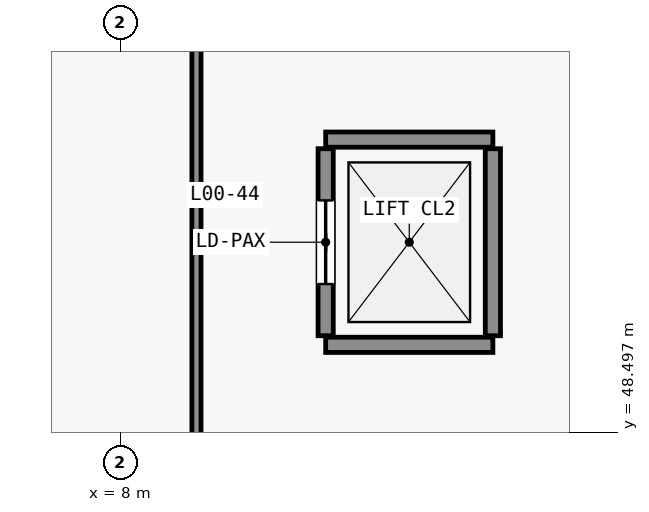
"""IFC4 building model, lengths in metres.
Left out: names, types, materials, properties, quantities, classifications, styles, units other than length and angle.
Written with IfcOpenShell. Run it as: python <this file> out.ifc"""

import sys

from ifc_helpers import new_model, si_unit, direction, frame, frame_2d, origin, place, context, subcontext, project, spatial, rectangle, extrude, element, fill, save


model = new_model("IFC4")
c1 = context("Model", 3, precision=1e-05, world=origin(), true_north=direction((0.0, 1.0)))
c2 = subcontext(c1, "Body", "Model", "MODEL_VIEW")
j1 = project(units=[si_unit("LENGTHUNIT", "METRE"), si_unit("PLANEANGLEUNIT", "RADIAN")], contexts=[c1])
p1 = place(None, origin())
s1 = spatial("IfcSite", under=j1, at=p1, CompositionType="ELEMENT")
p2 = place(p1, origin())
s2 = spatial("IfcBuilding", under=s1, at=p2, CompositionType="ELEMENT")
p3 = place(p2, origin())
s3 = spatial("IfcBuildingStorey", under=s2, at=p3, CompositionType="ELEMENT", Elevation=0.0)
for number, where, z_axis, x_axis in (
    (1, (10.7, 49.65, 0.0), (0.0, 0.0, 1.0), (1.0, 0.0, 0.0)),
    (2, (10.7, 52.35, 0.0), (0.0, 0.0, 1.0), (1.0, 0.0, 0.0)),
):
    element("IfcWall", number, at=place(p3, frame(where, z_axis=z_axis, x_axis=x_axis)), inside=s3, PredefinedType="STANDARD", context=c2, shape_type="SweptSolid", body=[
        extrude(rectangle(XDim=2.2, YDim=0.2, at=frame_2d((1.1, 0.0))), origin(), (0.0, 0.0, 1.0), 5.64),
    ])
p4 = place(p3, frame((10.7, 49.77, 0.0), z_axis=(0.0, 0.0, 1.0), x_axis=(0.0, 1.0, 0.0)))
e3 = element("IfcWall", 3, at=p4, inside=s3, PredefinedType="STANDARD", context=c2, shape_type="SweptSolid", body=[
    extrude(rectangle(XDim=2.46, YDim=0.2, at=frame_2d((1.23, 0.0))), origin(), (0.0, 0.0, 1.0), 5.64),
])
p5 = place(p4, frame((0.68, 0.0, 0.0)))
e4 = element("IfcOpeningElement", 4, at=p5, cuts=e3, PredefinedType="OPENING", context=c2, shape_type="SweptSolid", body=[
    extrude(rectangle(XDim=1.1, YDim=2.15, at=frame_2d((0.55, 1.075))), frame((0.0, 0.11, 0.0), z_axis=(0.0, -1.0, 0.0), x_axis=(1.0, 0.0, 0.0)), (0.0, 0.0, 1.0), 0.22),
])
p6 = place(p3, frame((12.9, 49.77, 0.0), z_axis=(0.0, 0.0, 1.0), x_axis=(0.0, 1.0, 0.0)))
e5 = element("IfcWall", 5, at=p6, inside=s3, PredefinedType="STANDARD", context=c2, shape_type="SweptSolid", body=[
    extrude(rectangle(XDim=2.46, YDim=0.2, at=frame_2d((1.23, 0.0))), origin(), (0.0, 0.0, 1.0), 5.64),
])
p7 = place(p3, frame((9.0, 33.62, 0.0), z_axis=(0.0, 0.0, 1.0), x_axis=(0.0, 1.0, 0.0)))
e6 = element("IfcWall", 6, at=p7, inside=s3, PredefinedType="PARTITIONING", context=c2, shape_type="SweptSolid", body=[
    extrude(rectangle(XDim=22.76, YDim=0.12, at=frame_2d((11.38, 0.0))), origin(), (0.0, 0.0, 1.0), 4.89),
])
p8 = place(p7, frame((9.38, 0.0, 0.0)))
e7 = element("IfcOpeningElement", 7, at=p8, cuts=e6, PredefinedType="OPENING", context=c2, shape_type="SweptSolid", body=[
    extrude(rectangle(XDim=1.6, YDim=2.25, at=frame_2d((0.8, 1.125))), frame((0.0, 0.07, 0.0), z_axis=(0.0, -1.0, 0.0), x_axis=(1.0, 0.0, 0.0)), (0.0, 0.0, 1.0), 0.14),
])
p9 = place(p5, origin())
e8 = element("IfcDoor", 8, at=p9, inside=s3, OperationType="SLIDING_TO_LEFT", PredefinedType="DOOR", context=c2, shape_type="SweptSolid", body=[
    extrude(rectangle(XDim=1.1, YDim=2.15, at=frame_2d((0.55, 1.075))), frame((0.0, 0.025, 0.0), z_axis=(0.0, -1.0, 0.0), x_axis=(1.0, 0.0, 0.0)), (0.0, 0.0, 1.0), 0.05),
])
fill(e4, e8)
save(model, sys.argv[1])
